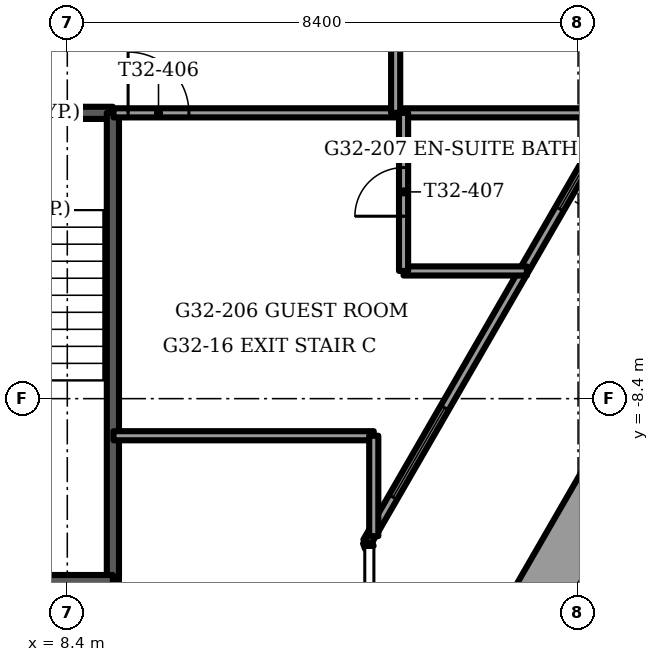
"""IFC4 building model, lengths in metres.
Left out: names, types, materials, properties, quantities, classifications, styles, units other than length and angle.
Written with IfcOpenShell. Run it as: python <this file> out.ifc"""

import sys

from ifc_helpers import new_model, si_unit, direction, frame, frame_2d, origin, place, context, subcontext, project, spatial, rectangle, extrude, element, fill, save


model = new_model("IFC4")
c1 = context("Model", 3, precision=1e-05, world=origin(), true_north=direction((0.0, 1.0)))
c2 = subcontext(c1, "Body", "Model", "MODEL_VIEW")
j1 = project(units=[si_unit("LENGTHUNIT", "METRE"), si_unit("PLANEANGLEUNIT", "RADIAN")], contexts=[c1])
p1 = place(None, origin())
s1 = spatial("IfcSite", under=j1, at=p1, CompositionType="ELEMENT")
p2 = place(p1, origin())
s2 = spatial("IfcBuilding", under=s1, at=p2, CompositionType="ELEMENT")
p3 = place(p2, frame((0.0, 0.0, 131.0)))
s3 = spatial("IfcBuildingStorey", under=s2, at=p3, CompositionType="ELEMENT", Elevation=131.0)
p4 = place(p3, frame((15.522, -12.815, 0.0), z_axis=(0.0, 0.0, 1.0), x_axis=(0.499999023957, 0.866025967302, 0.0)))
e1 = element("IfcWall", 1, at=p4, inside=s3, PredefinedType="PARAPET", context=c2, shape_type="SweptSolid", body=[
    extrude(rectangle(XDim=6.673, YDim=0.9, at=frame_2d((3.337, 0.0))), origin(), (0.0, 0.0, 1.0), 1.1),
])
p5 = place(p3, frame((13.334, -10.755, 0.0), z_axis=(0.0, 0.0, 1.0), x_axis=(0.499997430087, 0.866026887519, 0.0)))
e2 = element("IfcWall", 2, at=p5, inside=s3, PredefinedType="SOLIDWALL", context=c2, shape_type="SweptSolid", body=[
    extrude(rectangle(XDim=10.657, YDim=0.15, at=frame_2d((5.329, 0.0))), origin(), (0.0, 0.0, 1.0), 3.45),
])
p6 = place(p5, frame((0.847, 0.0, 0.15)))
e3 = element("IfcOpeningElement", 3, at=p6, cuts=e2, PredefinedType="OPENING", context=c2, shape_type="SweptSolid", body=[
    extrude(rectangle(XDim=1.7, YDim=2.2, at=frame_2d((0.85, 1.1))), frame((0.0, 0.075, 0.0), z_axis=(0.0, -1.0, 0.0), x_axis=(1.0, 0.0, 0.0)), (0.0, 0.0, 1.0), 0.15),
])
p7 = place(p5, frame((6.322, 0.0, 0.15)))
e4 = element("IfcOpeningElement", 4, at=p7, cuts=e2, PredefinedType="OPENING", context=c2, shape_type="SweptSolid", body=[
    extrude(rectangle(XDim=1.5, YDim=2.2, at=frame_2d((0.75, 1.1))), frame((0.0, 0.075, 0.0), z_axis=(0.0, -1.0, 0.0), x_axis=(1.0, 0.0, 0.0)), (0.0, 0.0, 1.0), 0.15),
])
p8 = place(p3, frame((13.334, -10.755, 0.0), z_axis=(0.0, 0.0, 1.0), x_axis=(0.337751931921, -0.941235163221, 0.0)))
e5 = element("IfcWall", 5, at=p8, inside=s3, PredefinedType="SOLIDWALL", context=c2, shape_type="SweptSolid", body=[
    extrude(rectangle(XDim=0.098, YDim=0.15, at=frame_2d((0.049, 0.0))), origin(), (0.0, 0.0, 1.0), 3.45),
])
p9 = place(p3, frame((5.8, -3.7, -0.3), z_axis=(0.0, 0.0, 1.0), x_axis=(1.0, 0.0, 0.0)))
e6 = element("IfcWall", 6, at=p9, inside=s3, PredefinedType="SOLIDWALL", context=c2, shape_type="SweptSolid", body=[
    extrude(rectangle(XDim=3.35, YDim=0.2, at=frame_2d((1.675, 0.0))), origin(), (0.0, 0.0, 1.0), 3.75),
])
p10 = place(p9, frame((1.125, 0.0, 0.0)))
e7 = element("IfcOpeningElement", 7, at=p10, cuts=e6, PredefinedType="OPENING", context=c2, shape_type="SweptSolid", body=[
    extrude(rectangle(XDim=1.1, YDim=2.1, at=frame_2d((0.55, 1.05))), frame((0.0, 0.1, 0.0), z_axis=(0.0, -1.0, 0.0), x_axis=(1.0, 0.0, 0.0)), (0.0, 0.0, 1.0), 0.2),
])
p11 = place(p3, frame((9.15, -3.7, -0.3), z_axis=(0.0, 0.0, 1.0), x_axis=(0.0, -1.0, 0.0)))
e8 = element("IfcWall", 8, at=p11, inside=s3, PredefinedType="SOLIDWALL", context=c2, shape_type="SweptSolid", body=[
    extrude(rectangle(XDim=7.7, YDim=0.2, at=frame_2d((3.85, 0.0))), origin(), (0.0, 0.0, 1.0), 3.75),
])
p12 = place(p3, frame((5.8, -11.4, -0.3), z_axis=(0.0, 0.0, 1.0), x_axis=(1.0, 0.0, 0.0)))
e9 = element("IfcWall", 9, at=p12, inside=s3, PredefinedType="SOLIDWALL", context=c2, shape_type="SweptSolid", body=[
    extrude(rectangle(XDim=3.35, YDim=0.2, at=frame_2d((1.675, 0.0))), origin(), (0.0, 0.0, 1.0), 3.75),
])
p13 = place(p3, frame((9.16, -9.01, 0.0), z_axis=(0.0, 0.0, 1.0), x_axis=(1.0, 0.0, 0.0)))
e10 = element("IfcWall", 10, at=p13, inside=s3, PredefinedType="PARTITIONING", context=c2, shape_type="SweptSolid", body=[
    extrude(rectangle(XDim=4.28, YDim=0.15, at=frame_2d((2.14, 0.0))), origin(), (0.0, 0.0, 1.0), 3.45),
])
p14 = place(p3, frame((13.93, -6.3, 0.0), z_axis=(0.0, 0.0, 1.0), x_axis=(1.0, 0.0, 0.0)))
e11 = element("IfcWall", 11, at=p14, inside=s3, PredefinedType="PARTITIONING", context=c2, shape_type="SweptSolid", body=[
    extrude(rectangle(XDim=2.028, YDim=0.15, at=frame_2d((1.014, 0.0))), origin(), (0.0, 0.0, 1.0), 3.45),
])
p15 = place(p3, frame((9.16, -3.7, 0.0), z_axis=(0.0, 0.0, 1.0), x_axis=(1.0, 0.0, 0.0)))
e12 = element("IfcWall", 12, at=p15, inside=s3, PredefinedType="PARTITIONING", context=c2, shape_type="SweptSolid", body=[
    extrude(rectangle(XDim=8.299, YDim=0.15, at=frame_2d((4.149, 0.0))), origin(), (0.0, 0.0, 1.0), 3.45),
])
p16 = place(p15, frame((0.24, 0.0, 0.0)))
e13 = element("IfcOpeningElement", 13, at=p16, cuts=e12, PredefinedType="OPENING", context=c2, shape_type="SweptSolid", body=[
    extrude(rectangle(XDim=1.0, YDim=2.1, at=frame_2d((0.5, 1.05))), frame((0.0, 0.075, 0.0), z_axis=(0.0, -1.0, 0.0), x_axis=(1.0, 0.0, 0.0)), (0.0, 0.0, 1.0), 0.15),
])
p17 = place(p3, frame((13.93, -6.3, 0.0), z_axis=(0.0, 0.0, 1.0), x_axis=(0.0, 1.0, 0.0)))
e14 = element("IfcWall", 14, at=p17, inside=s3, PredefinedType="PARTITIONING", context=c2, shape_type="SweptSolid", body=[
    extrude(rectangle(XDim=2.6, YDim=0.15, at=frame_2d((1.3, 0.0))), origin(), (0.0, 0.0, 1.0), 3.45),
])
p18 = place(p17, frame((0.9, 0.0, 0.0)))
e15 = element("IfcOpeningElement", 15, at=p18, cuts=e14, PredefinedType="OPENING", context=c2, shape_type="SweptSolid", body=[
    extrude(rectangle(XDim=0.8, YDim=2.1, at=frame_2d((0.4, 1.05))), frame((0.0, 0.075, 0.0), z_axis=(0.0, -1.0, 0.0), x_axis=(1.0, 0.0, 0.0)), (0.0, 0.0, 1.0), 0.15),
])
p19 = place(p3, frame((13.8, -3.7, 0.0), z_axis=(0.0, 0.0, 1.0), x_axis=(0.0, 1.0, 0.0)))
e16 = element("IfcWall", 16, at=p19, inside=s3, PredefinedType="PARTITIONING", context=c2, shape_type="SweptSolid", body=[
    extrude(rectangle(XDim=11.752, YDim=0.15, at=frame_2d((5.876, 0.0))), origin(), (0.0, 0.0, 1.0), 3.45),
])
p20 = place(p19, frame((1.6, 0.0, 0.0)))
e17 = element("IfcOpeningElement", 17, at=p20, cuts=e16, PredefinedType="OPENING", context=c2, shape_type="SweptSolid", body=[
    extrude(rectangle(XDim=1.0, YDim=2.1, at=frame_2d((0.5, 1.05))), frame((0.0, 0.075, 0.0), z_axis=(0.0, -1.0, 0.0), x_axis=(1.0, 0.0, 0.0)), (0.0, 0.0, 1.0), 0.15),
])
p21 = place(p19, frame((7.353, 0.0, 0.0)))
e18 = element("IfcOpeningElement", 18, at=p21, cuts=e16, PredefinedType="OPENING", context=c2, shape_type="SweptSolid", body=[
    extrude(rectangle(XDim=1.0, YDim=2.1, at=frame_2d((0.5, 1.05))), frame((0.0, 0.075, 0.0), z_axis=(0.0, -1.0, 0.0), x_axis=(1.0, 0.0, 0.0)), (0.0, 0.0, 1.0), 0.15),
])
p22 = place(p3, frame((13.44, -10.661, 0.0), z_axis=(0.0, 0.0, 1.0), x_axis=(0.0, 1.0, 0.0)))
e19 = element("IfcWall", 19, at=p22, inside=s3, PredefinedType="PARTITIONING", context=c2, shape_type="SweptSolid", body=[
    extrude(rectangle(XDim=1.651, YDim=0.15, at=frame_2d((0.825, 0.0))), origin(), (0.0, 0.0, 1.0), 3.45),
])
p23 = place(p6, origin())
e20 = element("IfcWindow", 20, at=p23, inside=s3, PartitioningType="SINGLE_PANEL", PredefinedType="WINDOW", context=c2, shape_type="SweptSolid", body=[
    extrude(rectangle(XDim=1.7, YDim=2.2, at=frame_2d((0.85, 1.1))), frame((0.0, 0.03, 0.0), z_axis=(0.0, -1.0, 0.0), x_axis=(1.0, 0.0, 0.0)), (0.0, 0.0, 1.0), 0.06),
])
fill(e3, e20)
p24 = place(p7, origin())
e21 = element("IfcWindow", 21, at=p24, inside=s3, PartitioningType="SINGLE_PANEL", PredefinedType="WINDOW", context=c2, shape_type="SweptSolid", body=[
    extrude(rectangle(XDim=1.5, YDim=2.2, at=frame_2d((0.75, 1.1))), frame((0.0, 0.03, 0.0), z_axis=(0.0, -1.0, 0.0), x_axis=(1.0, 0.0, 0.0)), (0.0, 0.0, 1.0), 0.06),
])
fill(e4, e21)
p25 = place(p16, origin())
e22 = element("IfcDoor", 22, at=p25, inside=s3, OperationType="SINGLE_SWING_LEFT", PredefinedType="DOOR", context=c2, shape_type="SweptSolid", body=[
    extrude(rectangle(XDim=1.0, YDim=2.1, at=frame_2d((0.5, 1.05))), frame((0.0, 0.025, 0.0), z_axis=(0.0, -1.0, 0.0), x_axis=(1.0, 0.0, 0.0)), (0.0, 0.0, 1.0), 0.05),
])
fill(e13, e22)
p26 = place(p18, origin())
e23 = element("IfcDoor", 23, at=p26, inside=s3, OperationType="SINGLE_SWING_RIGHT", PredefinedType="DOOR", context=c2, shape_type="SweptSolid", body=[
    extrude(rectangle(XDim=0.8, YDim=2.1, at=frame_2d((0.4, 1.05))), frame((0.0, 0.025, 0.0), z_axis=(0.0, -1.0, 0.0), x_axis=(1.0, 0.0, 0.0)), (0.0, 0.0, 1.0), 0.05),
])
fill(e15, e23)
save(model, sys.argv[1])
